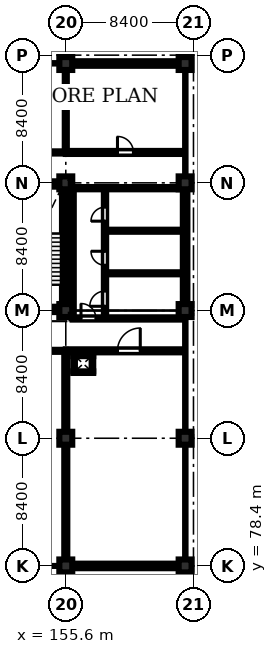
"""IFC4 building model, lengths in metres.
Left out: names, types, materials, properties, quantities, classifications, styles, units other than length and angle.
Written with IfcOpenShell. Run it as: python <this file> out.ifc"""

import sys

from ifc_helpers import new_model, si_unit, direction, frame, frame_2d, origin, origin_2d, place, context, subcontext, project, spatial, rectangle, extrude, element, fill, save


model = new_model("IFC4")
c1 = context("Model", 3, precision=1e-05, world=origin(), true_north=direction((0.0, 1.0)))
c2 = subcontext(c1, "Body", "Model", "MODEL_VIEW")
j1 = project(units=[si_unit("LENGTHUNIT", "METRE"), si_unit("PLANEANGLEUNIT", "RADIAN")], contexts=[c1])
p1 = place(None, origin())
s1 = spatial("IfcSite", under=j1, at=p1, CompositionType="ELEMENT")
p2 = place(p1, origin())
s2 = spatial("IfcBuilding", under=s1, at=p2, CompositionType="ELEMENT")
p3 = place(p2, frame((0.0, 0.0, 27.6)))
s3 = spatial("IfcBuildingStorey", under=s2, at=p3, CompositionType="ELEMENT", Elevation=27.6)
for number, where, z_axis, x_axis in (
    (1, (155.6, 78.4, 0.0), (0.0, 0.0, 1.0), (1.0, 0.0, 0.0)),
    (2, (155.6, 86.8, 0.0), (0.0, 0.0, 1.0), (1.0, 0.0, 0.0)),
    (3, (155.6, 95.2, 0.0), (0.0, 0.0, 1.0), (1.0, 0.0, 0.0)),
    (4, (155.6, 103.6, 0.0), (0.0, 0.0, 1.0), (1.0, 0.0, 0.0)),
    (5, (155.6, 111.45, 0.0), (0.0, 0.0, 1.0), (1.0, 0.0, 0.0)),
    (6, (163.45, 78.4, 0.0), (0.0, 0.0, 1.0), (1.0, 0.0, 0.0)),
    (7, (163.45, 86.8, 0.0), (0.0, 0.0, 1.0), (1.0, 0.0, 0.0)),
    (8, (163.45, 95.2, 0.0), (0.0, 0.0, 1.0), (1.0, 0.0, 0.0)),
    (9, (163.45, 103.6, 0.0), (0.0, 0.0, 1.0), (1.0, 0.0, 0.0)),
    (10, (163.45, 111.45, 0.0), (0.0, 0.0, 1.0), (1.0, 0.0, 0.0)),
):
    element("IfcColumn", number, at=place(p3, frame(where, z_axis=z_axis, x_axis=x_axis)), inside=s3, PredefinedType="COLUMN", context=c2, shape_type="SweptSolid", body=[
        extrude(rectangle(XDim=0.85, YDim=0.85, at=origin_2d()), origin(), (0.0, 0.0, 1.0), 4.02),
    ])
for number, where, z_axis, x_axis in (
    (11, (151.9, 95.275, 0.0), (0.0, 0.0, 1.0), (1.0, 0.0, 0.0)),
    (12, (151.9, 103.525, 0.0), (0.0, 0.0, 1.0), (1.0, 0.0, 0.0)),
):
    element("IfcWall", number, at=place(p3, frame(where, z_axis=z_axis, x_axis=x_axis)), inside=s3, PredefinedType="SHEAR", context=c2, shape_type="SweptSolid", body=[
        extrude(rectangle(XDim=3.8, YDim=0.35, at=frame_2d((1.9, 0.0))), origin(), (0.0, 0.0, 1.0), 4.02),
    ])
p4 = place(p3, frame((155.525, 95.45, 0.0), z_axis=(0.0, 0.0, 1.0), x_axis=(0.0, 1.0, 0.0)))
e13 = element("IfcWall", 13, at=p4, inside=s3, PredefinedType="SHEAR", context=c2, shape_type="SweptSolid", body=[
    extrude(rectangle(XDim=7.9, YDim=0.35, at=frame_2d((3.95, 0.0))), origin(), (0.0, 0.0, 1.0), 4.02),
])
p5 = place(p3, frame((156.025, 111.45, 0.0), z_axis=(0.0, 0.0, 1.0), x_axis=(1.0, 0.0, 0.0)))
e14 = element("IfcWall", 14, at=p5, inside=s3, PredefinedType="STANDARD", context=c2, shape_type="SweptSolid", body=[
    extrude(rectangle(XDim=7.0, YDim=0.3, at=frame_2d((3.5, 0.0))), origin(), (0.0, 0.0, 1.0), 3.32),
])
p6 = place(p5, frame((0.85, 0.0, 0.9)))
e15 = element("IfcOpeningElement", 15, at=p6, cuts=e14, PredefinedType="OPENING", context=c2, shape_type="SweptSolid", body=[
    extrude(rectangle(XDim=1.8, YDim=2.1, at=frame_2d((0.9, 1.05))), frame((0.0, 0.16, 0.0), z_axis=(0.0, -1.0, 0.0), x_axis=(1.0, 0.0, 0.0)), (0.0, 0.0, 1.0), 0.32),
])
p7 = place(p5, frame((4.65, 0.0, 0.9)))
e16 = element("IfcOpeningElement", 16, at=p7, cuts=e14, PredefinedType="OPENING", context=c2, shape_type="SweptSolid", body=[
    extrude(rectangle(XDim=1.8, YDim=2.1, at=frame_2d((0.9, 1.05))), frame((0.0, 0.16, 0.0), z_axis=(0.0, -1.0, 0.0), x_axis=(1.0, 0.0, 0.0)), (0.0, 0.0, 1.0), 0.32),
])
p8 = place(p3, frame((163.025, 78.4, 0.0), z_axis=(0.0, 0.0, 1.0), x_axis=(-1.0, 0.0, 0.0)))
e17 = element("IfcWall", 17, at=p8, inside=s3, PredefinedType="STANDARD", context=c2, shape_type="SweptSolid", body=[
    extrude(rectangle(XDim=7.0, YDim=0.3, at=frame_2d((3.5, 0.0))), origin(), (0.0, 0.0, 1.0), 3.32),
])
p9 = place(p8, frame((1.15, 0.0, 0.95)))
e18 = element("IfcOpeningElement", 18, at=p9, cuts=e17, PredefinedType="OPENING", context=c2, shape_type="SweptSolid", body=[
    extrude(rectangle(XDim=1.85, YDim=2.05, at=frame_2d((0.925, 1.025))), frame((0.0, 0.16, 0.0), z_axis=(0.0, -1.0, 0.0), x_axis=(1.0, 0.0, 0.0)), (0.0, 0.0, 1.0), 0.32),
])
p10 = place(p3, frame((163.45, 103.175, 0.0), z_axis=(0.0, 0.0, 1.0), x_axis=(0.0, -1.0, 0.0)))
e19 = element("IfcWall", 19, at=p10, inside=s3, PredefinedType="STANDARD", context=c2, shape_type="SweptSolid", body=[
    extrude(rectangle(XDim=7.55, YDim=0.3, at=frame_2d((3.775, 0.0))), origin(), (0.0, 0.0, 1.0), 3.32),
])
p11 = place(p10, frame((1.15, 0.0, 1.1)))
e20 = element("IfcOpeningElement", 20, at=p11, cuts=e19, PredefinedType="OPENING", context=c2, shape_type="SweptSolid", body=[
    extrude(rectangle(XDim=1.4, YDim=1.4, at=frame_2d((0.7, 0.7))), frame((0.0, 0.16, 0.0), z_axis=(0.0, -1.0, 0.0), x_axis=(1.0, 0.0, 0.0)), (0.0, 0.0, 1.0), 0.32),
])
p12 = place(p3, frame((156.05, 94.68, 0.0), z_axis=(0.0, 0.0, 1.0), x_axis=(1.0, 0.0, 0.0)))
e21 = element("IfcWall", 21, at=p12, inside=s3, PredefinedType="PARTITIONING", context=c2, shape_type="SweptSolid", body=[
    extrude(rectangle(XDim=7.15, YDim=0.15, at=frame_2d((3.575, 0.0))), origin(), (0.0, 0.0, 1.0), 4.02),
])
p13 = place(p12, frame((0.55, 0.0, 0.0)))
e22 = element("IfcOpeningElement", 22, at=p13, cuts=e21, PredefinedType="OPENING", context=c2, shape_type="SweptSolid", body=[
    extrude(rectangle(XDim=0.98, YDim=2.12, at=frame_2d((0.49, 1.06))), frame((0.0, 0.085, 0.0), z_axis=(0.0, -1.0, 0.0), x_axis=(1.0, 0.0, 0.0)), (0.0, 0.0, 1.0), 0.17),
])
p14 = place(p3, frame((158.18, 94.68, 0.0), z_axis=(0.0, 0.0, 1.0), x_axis=(0.0, 1.0, 0.0)))
e23 = element("IfcWall", 23, at=p14, inside=s3, PredefinedType="PARTITIONING", context=c2, shape_type="SweptSolid", body=[
    extrude(rectangle(XDim=8.57, YDim=0.15, at=frame_2d((4.285, 0.0))), origin(), (0.0, 0.0, 1.0), 4.02),
])
p15 = place(p14, frame((0.8, 0.0, 0.0)))
e24 = element("IfcOpeningElement", 24, at=p15, cuts=e23, PredefinedType="OPENING", context=c2, shape_type="SweptSolid", body=[
    extrude(rectangle(XDim=1.0, YDim=2.12, at=frame_2d((0.5, 1.06))), frame((0.0, 0.085, 0.0), z_axis=(0.0, -1.0, 0.0), x_axis=(1.0, 0.0, 0.0)), (0.0, 0.0, 1.0), 0.17),
])
p16 = place(p14, frame((3.5, 0.0, 0.0)))
e25 = element("IfcOpeningElement", 25, at=p16, cuts=e23, PredefinedType="OPENING", context=c2, shape_type="SweptSolid", body=[
    extrude(rectangle(XDim=0.92, YDim=2.1, at=frame_2d((0.46, 1.05))), frame((0.0, 0.085, 0.0), z_axis=(0.0, -1.0, 0.0), x_axis=(1.0, 0.0, 0.0)), (0.0, 0.0, 1.0), 0.17),
])
p17 = place(p14, frame((6.4, 0.0, 0.0)))
e26 = element("IfcOpeningElement", 26, at=p17, cuts=e23, PredefinedType="OPENING", context=c2, shape_type="SweptSolid", body=[
    extrude(rectangle(XDim=0.92, YDim=2.1, at=frame_2d((0.46, 1.05))), frame((0.0, 0.085, 0.0), z_axis=(0.0, -1.0, 0.0), x_axis=(1.0, 0.0, 0.0)), (0.0, 0.0, 1.0), 0.17),
])
for number, where, z_axis, x_axis in (
    (27, (158.18, 97.65, 0.0), (0.0, 0.0, 1.0), (1.0, 0.0, 0.0)),
    (28, (158.18, 100.45, 0.0), (0.0, 0.0, 1.0), (1.0, 0.0, 0.0)),
):
    element("IfcWall", number, at=place(p3, frame(where, z_axis=z_axis, x_axis=x_axis)), inside=s3, PredefinedType="PARTITIONING", context=c2, shape_type="SweptSolid", body=[
        extrude(rectangle(XDim=5.02, YDim=0.135, at=frame_2d((2.51, 0.0))), origin(), (0.0, 0.0, 1.0), 4.02),
    ])
p18 = place(p3, frame((156.05, 103.25, 0.0), z_axis=(0.0, 0.0, 1.0), x_axis=(1.0, 0.0, 0.0)))
e29 = element("IfcWall", 29, at=p18, inside=s3, PredefinedType="PARTITIONING", context=c2, shape_type="SweptSolid", body=[
    extrude(rectangle(XDim=7.15, YDim=0.15, at=frame_2d((3.575, 0.0))), origin(), (0.0, 0.0, 1.0), 4.02),
])
p19 = place(p3, frame((156.05, 94.68, 0.0), z_axis=(0.0, 0.0, 1.0), x_axis=(0.0, 1.0, 0.0)))
e30 = element("IfcWall", 30, at=p19, inside=s3, PredefinedType="PARTITIONING", context=c2, shape_type="SweptSolid", body=[
    extrude(rectangle(XDim=8.57, YDim=0.15, at=frame_2d((4.285, 0.0))), origin(), (0.0, 0.0, 1.0), 4.02),
])
p20 = place(p3, frame((138.8, 105.6, 0.0), z_axis=(0.0, 0.0, 1.0), x_axis=(1.0, 0.0, 0.0)))
e31 = element("IfcWall", 31, at=p20, inside=s3, PredefinedType="PARTITIONING", context=c2, shape_type="SweptSolid", body=[
    extrude(rectangle(XDim=16.8, YDim=0.145, at=frame_2d((8.4, 0.0))), origin(), (0.0, 0.0, 1.0), 4.02),
])
p21 = place(p20, frame((3.4, 0.0, 0.0)))
e32 = element("IfcOpeningElement", 32, at=p21, cuts=e31, PredefinedType="OPENING", context=c2, shape_type="SweptSolid", body=[
    extrude(rectangle(XDim=1.52, YDim=2.22, at=frame_2d((0.76, 1.11))), frame((0.0, 0.083, 0.0), z_axis=(0.0, -1.0, 0.0), x_axis=(1.0, 0.0, 0.0)), (0.0, 0.0, 1.0), 0.165),
])
p22 = place(p3, frame((155.6, 105.6, 0.0), z_axis=(0.0, 0.0, 1.0), x_axis=(1.0, 0.0, 0.0)))
e33 = element("IfcWall", 33, at=p22, inside=s3, PredefinedType="SOLIDWALL", context=c2, shape_type="SweptSolid", body=[
    extrude(rectangle(XDim=7.75, YDim=0.2, at=frame_2d((3.875, 0.0))), origin(), (0.0, 0.0, 1.0), 4.02),
])
p23 = place(p22, frame((3.4, 0.0, 0.0)))
e34 = element("IfcOpeningElement", 34, at=p23, cuts=e33, PredefinedType="OPENING", context=c2, shape_type="SweptSolid", body=[
    extrude(rectangle(XDim=1.05, YDim=2.15, at=frame_2d((0.525, 1.075))), frame((0.0, 0.11, 0.0), z_axis=(0.0, -1.0, 0.0), x_axis=(1.0, 0.0, 0.0)), (0.0, 0.0, 1.0), 0.22),
])
p24 = place(p3, frame((155.6, 105.6, 0.0), z_axis=(0.0, 0.0, 1.0), x_axis=(0.0, 1.0, 0.0)))
e35 = element("IfcWall", 35, at=p24, inside=s3, PredefinedType="PARTITIONING", context=c2, shape_type="SweptSolid", body=[
    extrude(rectangle(XDim=5.75, YDim=0.135, at=frame_2d((2.875, 0.0))), origin(), (0.0, 0.0, 1.0), 3.32),
])
p25 = place(p3, frame((143.0, 92.55, 0.0), z_axis=(0.0, 0.0, 1.0), x_axis=(1.0, 0.0, 0.0)))
e36 = element("IfcWall", 36, at=p25, inside=s3, PredefinedType="PARTITIONING", context=c2, shape_type="SweptSolid", body=[
    extrude(rectangle(XDim=12.6, YDim=0.135, at=frame_2d((6.3, 0.0))), origin(), (0.0, 0.0, 1.0), 4.02),
])
p26 = place(p25, frame((6.8, 0.0, 0.0)))
e37 = element("IfcOpeningElement", 37, at=p26, cuts=e36, PredefinedType="OPENING", context=c2, shape_type="SweptSolid", body=[
    extrude(rectangle(XDim=1.08, YDim=2.15, at=frame_2d((0.54, 1.075))), frame((0.0, 0.077, 0.0), z_axis=(0.0, -1.0, 0.0), x_axis=(1.0, 0.0, 0.0)), (0.0, 0.0, 1.0), 0.155),
])
p27 = place(p3, frame((155.6, 92.55, 0.0), z_axis=(0.0, 0.0, 1.0), x_axis=(1.0, 0.0, 0.0)))
e38 = element("IfcWall", 38, at=p27, inside=s3, PredefinedType="SOLIDWALL", context=c2, shape_type="SweptSolid", body=[
    extrude(rectangle(XDim=7.75, YDim=0.2, at=frame_2d((3.875, 0.0))), origin(), (0.0, 0.0, 1.0), 4.02),
])
p28 = place(p27, frame((3.4, 0.0, 0.0)))
e39 = element("IfcOpeningElement", 39, at=p28, cuts=e38, PredefinedType="OPENING", context=c2, shape_type="SweptSolid", body=[
    extrude(rectangle(XDim=1.5, YDim=2.2, at=frame_2d((0.75, 1.1))), frame((0.0, 0.11, 0.0), z_axis=(0.0, -1.0, 0.0), x_axis=(1.0, 0.0, 0.0)), (0.0, 0.0, 1.0), 0.22),
])
p29 = place(p3, frame((155.6, 78.55, 0.0), z_axis=(0.0, 0.0, 1.0), x_axis=(0.0, 1.0, 0.0)))
e40 = element("IfcWall", 40, at=p29, inside=s3, PredefinedType="SOLIDWALL", context=c2, shape_type="SweptSolid", body=[
    extrude(rectangle(XDim=14.0, YDim=0.2, at=frame_2d((7.0, 0.0))), origin(), (0.0, 0.0, 1.0), 3.32),
])
for number, where, z_axis, x_axis in (
    (41, (156.095, 91.147, 0.0), (0.0, 0.0, 1.0), (1.0, 0.0, 0.0)),
    (42, (156.095, 92.252, 0.0), (0.0, 0.0, 1.0), (1.0, 0.0, 0.0)),
):
    element("IfcWall", number, at=place(p3, frame(where, z_axis=z_axis, x_axis=x_axis)), inside=s3, PredefinedType="PARTITIONING", context=c2, shape_type="SweptSolid", body=[
        extrude(rectangle(XDim=1.31, YDim=0.105, at=frame_2d((0.655, 0.0))), origin(), (0.0, 0.0, 1.0), 4.02),
    ])
for number, where, z_axis, x_axis in (
    (43, (156.147, 91.2, 0.0), (0.0, 0.0, 1.0), (0.0, 1.0, 0.0)),
    (44, (157.353, 91.2, 0.0), (0.0, 0.0, 1.0), (0.0, 1.0, 0.0)),
):
    element("IfcWall", number, at=place(p3, frame(where, z_axis=z_axis, x_axis=x_axis)), inside=s3, PredefinedType="PARTITIONING", context=c2, shape_type="SweptSolid", body=[
        extrude(rectangle(XDim=1.0, YDim=0.105, at=frame_2d((0.5, 0.0))), origin(), (0.0, 0.0, 1.0), 4.02),
    ])
p30 = place(p6, origin())
e45 = element("IfcWindow", 45, at=p30, inside=s3, PartitioningType="DOUBLE_PANEL_VERTICAL", PredefinedType="WINDOW", context=c2, shape_type="SweptSolid", body=[
    extrude(rectangle(XDim=1.8, YDim=2.1, at=frame_2d((0.9, 1.05))), frame((0.0, 0.03, 0.0), z_axis=(0.0, -1.0, 0.0), x_axis=(1.0, 0.0, 0.0)), (0.0, 0.0, 1.0), 0.06),
])
fill(e15, e45)
p31 = place(p7, origin())
e46 = element("IfcWindow", 46, at=p31, inside=s3, PartitioningType="DOUBLE_PANEL_VERTICAL", PredefinedType="WINDOW", context=c2, shape_type="SweptSolid", body=[
    extrude(rectangle(XDim=1.8, YDim=2.1, at=frame_2d((0.9, 1.05))), frame((0.0, 0.03, 0.0), z_axis=(0.0, -1.0, 0.0), x_axis=(1.0, 0.0, 0.0)), (0.0, 0.0, 1.0), 0.06),
])
fill(e16, e46)
p32 = place(p9, origin())
e47 = element("IfcWindow", 47, at=p32, inside=s3, PartitioningType="DOUBLE_PANEL_VERTICAL", PredefinedType="WINDOW", context=c2, shape_type="SweptSolid", body=[
    extrude(rectangle(XDim=1.85, YDim=2.05, at=frame_2d((0.925, 1.025))), frame((0.0, 0.03, 0.0), z_axis=(0.0, -1.0, 0.0), x_axis=(1.0, 0.0, 0.0)), (0.0, 0.0, 1.0), 0.06),
])
fill(e18, e47)
p33 = place(p11, origin())
e48 = element("IfcWindow", 48, at=p33, inside=s3, PartitioningType="SINGLE_PANEL", PredefinedType="WINDOW", context=c2, shape_type="SweptSolid", body=[
    extrude(rectangle(XDim=1.4, YDim=1.4, at=frame_2d((0.7, 0.7))), frame((0.0, 0.03, 0.0), z_axis=(0.0, -1.0, 0.0), x_axis=(1.0, 0.0, 0.0)), (0.0, 0.0, 1.0), 0.06),
])
fill(e20, e48)
p34 = place(p13, origin())
e49 = element("IfcDoor", 49, at=p34, inside=s3, OperationType="SINGLE_SWING_LEFT", PredefinedType="DOOR", context=c2, shape_type="SweptSolid", body=[
    extrude(rectangle(XDim=0.98, YDim=2.12, at=frame_2d((0.49, 1.06))), frame((0.0, 0.025, 0.0), z_axis=(0.0, -1.0, 0.0), x_axis=(1.0, 0.0, 0.0)), (0.0, 0.0, 1.0), 0.05),
])
fill(e22, e49)
p35 = place(p15, origin())
e50 = element("IfcDoor", 50, at=p35, inside=s3, OperationType="SINGLE_SWING_LEFT", PredefinedType="DOOR", context=c2, shape_type="SweptSolid", body=[
    extrude(rectangle(XDim=1.0, YDim=2.12, at=frame_2d((0.5, 1.06))), frame((0.0, 0.025, 0.0), z_axis=(0.0, -1.0, 0.0), x_axis=(1.0, 0.0, 0.0)), (0.0, 0.0, 1.0), 0.05),
])
fill(e24, e50)
p36 = place(p16, origin())
e51 = element("IfcDoor", 51, at=p36, inside=s3, OperationType="SINGLE_SWING_RIGHT", PredefinedType="DOOR", context=c2, shape_type="SweptSolid", body=[
    extrude(rectangle(XDim=0.92, YDim=2.1, at=frame_2d((0.46, 1.05))), frame((0.0, 0.025, 0.0), z_axis=(0.0, -1.0, 0.0), x_axis=(1.0, 0.0, 0.0)), (0.0, 0.0, 1.0), 0.05),
])
fill(e25, e51)
p37 = place(p17, origin())
e52 = element("IfcDoor", 52, at=p37, inside=s3, OperationType="SINGLE_SWING_LEFT", PredefinedType="DOOR", context=c2, shape_type="SweptSolid", body=[
    extrude(rectangle(XDim=0.92, YDim=2.1, at=frame_2d((0.46, 1.05))), frame((0.0, 0.025, 0.0), z_axis=(0.0, -1.0, 0.0), x_axis=(1.0, 0.0, 0.0)), (0.0, 0.0, 1.0), 0.05),
])
fill(e26, e52)
p38 = place(p23, origin())
e53 = element("IfcDoor", 53, at=p38, inside=s3, OperationType="SINGLE_SWING_LEFT", PredefinedType="DOOR", context=c2, shape_type="SweptSolid", body=[
    extrude(rectangle(XDim=1.05, YDim=2.15, at=frame_2d((0.525, 1.075))), frame((0.0, 0.025, 0.0), z_axis=(0.0, -1.0, 0.0), x_axis=(1.0, 0.0, 0.0)), (0.0, 0.0, 1.0), 0.05),
])
fill(e34, e53)
p39 = place(p28, origin())
e54 = element("IfcDoor", 54, at=p39, inside=s3, OperationType="SINGLE_SWING_RIGHT", PredefinedType="DOOR", context=c2, shape_type="SweptSolid", body=[
    extrude(rectangle(XDim=1.5, YDim=2.2, at=frame_2d((0.75, 1.1))), frame((0.0, 0.025, 0.0), z_axis=(0.0, -1.0, 0.0), x_axis=(1.0, 0.0, 0.0)), (0.0, 0.0, 1.0), 0.05),
])
fill(e39, e54)
save(model, sys.argv[1])
